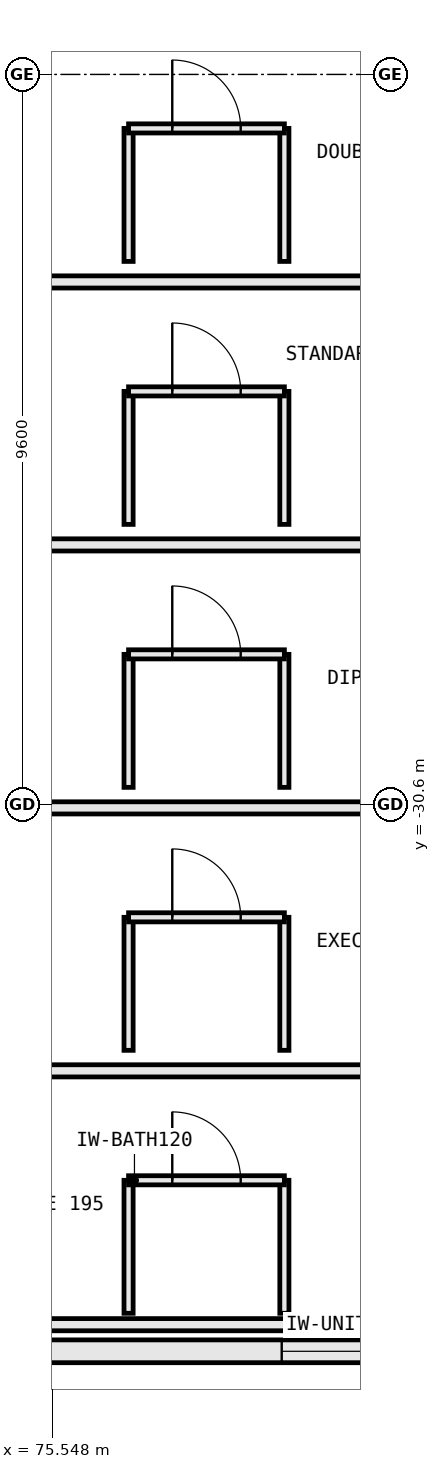
"""IFC4 building model, lengths in metres.
Left out: names, types, materials, properties, quantities, classifications, styles, units other than length and angle.
Written with IfcOpenShell. Run it as: python <this file> out.ifc"""

import sys

from ifc_helpers import new_model, si_unit, direction, frame, frame_2d, origin, place, context, subcontext, project, spatial, rectangle, extrude, element, fill, save


model = new_model("IFC4")
c1 = context("Model", 3, precision=1e-05, world=origin(), true_north=direction((0.0, 1.0)))
c2 = subcontext(c1, "Body", "Model", "MODEL_VIEW")
j1 = project(units=[si_unit("LENGTHUNIT", "METRE"), si_unit("PLANEANGLEUNIT", "RADIAN")], contexts=[c1])
p1 = place(None, origin())
s1 = spatial("IfcSite", under=j1, at=p1, CompositionType="ELEMENT")
p2 = place(p1, origin())
s2 = spatial("IfcBuilding", under=s1, at=p2, CompositionType="ELEMENT")
p3 = place(p2, frame((0.0, 0.0, 27.6)))
s3 = spatial("IfcBuildingStorey", under=s2, at=p3, CompositionType="ELEMENT", Elevation=27.6)
p4 = place(p3, frame((75.038, -37.8, 0.0), z_axis=(0.0, 0.0, 1.0), x_axis=(1.0, 0.0, 0.0)))
e1 = element("IfcWall", 1, at=p4, inside=s3, PredefinedType="STANDARD", context=c2, shape_type="SweptSolid", body=[
    extrude(rectangle(XDim=8.704, YDim=0.3, at=frame_2d((4.352, 0.0))), origin(), (0.0, 0.0, 1.0), 2.93),
])
p5 = place(p4, frame((3.527, 0.0, 0.85)))
e2 = element("IfcOpeningElement", 2, at=p5, cuts=e1, PredefinedType="OPENING", context=c2, shape_type="SweptSolid", body=[
    extrude(rectangle(XDim=1.65, YDim=1.8, at=frame_2d((0.825, 0.9))), frame((0.0, 0.162, 0.0), z_axis=(0.0, -1.0, 0.0), x_axis=(1.0, 0.0, 0.0)), (0.0, 0.0, 1.0), 0.324),
])
p6 = place(p3, frame((71.05, -37.45, 0.0), z_axis=(0.0, 0.0, 1.0), x_axis=(1.0, 0.0, 0.0)))
e3 = element("IfcWall", 3, at=p6, inside=s3, PredefinedType="PARTITIONING", context=c2, shape_type="SweptSolid", body=[
    extrude(rectangle(XDim=12.79, YDim=0.16, at=frame_2d((6.395, 0.0))), origin(), (0.0, 0.0, 1.0), 2.83),
])
p7 = place(p3, frame((71.05, -34.11, 0.0), z_axis=(0.0, 0.0, 1.0), x_axis=(1.0, 0.0, 0.0)))
e4 = element("IfcWall", 4, at=p7, inside=s3, PredefinedType="PARTITIONING", context=c2, shape_type="SweptSolid", body=[
    extrude(rectangle(XDim=12.79, YDim=0.16, at=frame_2d((6.395, 0.0))), origin(), (0.0, 0.0, 1.0), 3.555),
])
for number, where, z_axis, x_axis in (
    (5, (76.55, -37.3, 0.0), (0.0, 0.0, 1.0), (0.0, 1.0, 0.0)),
    (6, (78.6, -37.3, 0.0), (0.0, 0.0, 1.0), (0.0, 1.0, 0.0)),
):
    element("IfcWall", number, at=place(p3, frame(where, z_axis=z_axis, x_axis=x_axis)), inside=s3, PredefinedType="PARTITIONING", context=c2, shape_type="SweptSolid", body=[
        extrude(rectangle(XDim=1.75, YDim=0.12, at=frame_2d((0.875, 0.0))), origin(), (0.0, 0.0, 1.0), 3.555),
    ])
p8 = place(p3, frame((76.55, -35.55, 0.0), z_axis=(0.0, 0.0, 1.0), x_axis=(1.0, 0.0, 0.0)))
e7 = element("IfcWall", 7, at=p8, inside=s3, PredefinedType="PARTITIONING", context=c2, shape_type="SweptSolid", body=[
    extrude(rectangle(XDim=2.05, YDim=0.12, at=frame_2d((1.025, 0.0))), origin(), (0.0, 0.0, 1.0), 3.555),
])
p9 = place(p8, frame((0.575, 0.0, 0.0)))
e8 = element("IfcOpeningElement", 8, at=p9, cuts=e7, PredefinedType="OPENING", context=c2, shape_type="SweptSolid", body=[
    extrude(rectangle(XDim=0.9, YDim=2.15, at=frame_2d((0.45, 1.075))), frame((0.0, 0.072, 0.0), z_axis=(0.0, -1.0, 0.0), x_axis=(1.0, 0.0, 0.0)), (0.0, 0.0, 1.0), 0.144),
])
p10 = place(p3, frame((71.05, -30.65, 0.0), z_axis=(0.0, 0.0, 1.0), x_axis=(1.0, 0.0, 0.0)))
e9 = element("IfcWall", 9, at=p10, inside=s3, PredefinedType="PARTITIONING", context=c2, shape_type="SweptSolid", body=[
    extrude(rectangle(XDim=12.79, YDim=0.16, at=frame_2d((6.395, 0.0))), origin(), (0.0, 0.0, 1.0), 3.555),
])
for number, where, z_axis, x_axis in (
    (10, (76.55, -33.84, 0.0), (0.0, 0.0, 1.0), (0.0, 1.0, 0.0)),
    (11, (78.6, -33.84, 0.0), (0.0, 0.0, 1.0), (0.0, 1.0, 0.0)),
):
    element("IfcWall", number, at=place(p3, frame(where, z_axis=z_axis, x_axis=x_axis)), inside=s3, PredefinedType="PARTITIONING", context=c2, shape_type="SweptSolid", body=[
        extrude(rectangle(XDim=1.75, YDim=0.12, at=frame_2d((0.875, 0.0))), origin(), (0.0, 0.0, 1.0), 3.555),
    ])
p11 = place(p3, frame((76.55, -32.09, 0.0), z_axis=(0.0, 0.0, 1.0), x_axis=(1.0, 0.0, 0.0)))
e12 = element("IfcWall", 12, at=p11, inside=s3, PredefinedType="PARTITIONING", context=c2, shape_type="SweptSolid", body=[
    extrude(rectangle(XDim=2.05, YDim=0.12, at=frame_2d((1.025, 0.0))), origin(), (0.0, 0.0, 1.0), 3.555),
])
p12 = place(p11, frame((0.575, 0.0, 0.0)))
e13 = element("IfcOpeningElement", 13, at=p12, cuts=e12, PredefinedType="OPENING", context=c2, shape_type="SweptSolid", body=[
    extrude(rectangle(XDim=0.9, YDim=2.15, at=frame_2d((0.45, 1.075))), frame((0.0, 0.072, 0.0), z_axis=(0.0, -1.0, 0.0), x_axis=(1.0, 0.0, 0.0)), (0.0, 0.0, 1.0), 0.144),
])
p13 = place(p3, frame((71.05, -27.19, 0.0), z_axis=(0.0, 0.0, 1.0), x_axis=(1.0, 0.0, 0.0)))
e14 = element("IfcWall", 14, at=p13, inside=s3, PredefinedType="PARTITIONING", context=c2, shape_type="SweptSolid", body=[
    extrude(rectangle(XDim=12.79, YDim=0.16, at=frame_2d((6.395, 0.0))), origin(), (0.0, 0.0, 1.0), 3.555),
])
for number, where, z_axis, x_axis in (
    (15, (76.55, -30.38, 0.0), (0.0, 0.0, 1.0), (0.0, 1.0, 0.0)),
    (16, (78.6, -30.38, 0.0), (0.0, 0.0, 1.0), (0.0, 1.0, 0.0)),
):
    element("IfcWall", number, at=place(p3, frame(where, z_axis=z_axis, x_axis=x_axis)), inside=s3, PredefinedType="PARTITIONING", context=c2, shape_type="SweptSolid", body=[
        extrude(rectangle(XDim=1.75, YDim=0.12, at=frame_2d((0.875, 0.0))), origin(), (0.0, 0.0, 1.0), 3.555),
    ])
p14 = place(p3, frame((76.55, -28.63, 0.0), z_axis=(0.0, 0.0, 1.0), x_axis=(1.0, 0.0, 0.0)))
e17 = element("IfcWall", 17, at=p14, inside=s3, PredefinedType="PARTITIONING", context=c2, shape_type="SweptSolid", body=[
    extrude(rectangle(XDim=2.05, YDim=0.12, at=frame_2d((1.025, 0.0))), origin(), (0.0, 0.0, 1.0), 3.555),
])
p15 = place(p14, frame((0.575, 0.0, 0.0)))
e18 = element("IfcOpeningElement", 18, at=p15, cuts=e17, PredefinedType="OPENING", context=c2, shape_type="SweptSolid", body=[
    extrude(rectangle(XDim=0.9, YDim=2.15, at=frame_2d((0.45, 1.075))), frame((0.0, 0.072, 0.0), z_axis=(0.0, -1.0, 0.0), x_axis=(1.0, 0.0, 0.0)), (0.0, 0.0, 1.0), 0.144),
])
p16 = place(p3, frame((71.05, -23.73, 0.0), z_axis=(0.0, 0.0, 1.0), x_axis=(1.0, 0.0, 0.0)))
e19 = element("IfcWall", 19, at=p16, inside=s3, PredefinedType="PARTITIONING", context=c2, shape_type="SweptSolid", body=[
    extrude(rectangle(XDim=12.79, YDim=0.16, at=frame_2d((6.395, 0.0))), origin(), (0.0, 0.0, 1.0), 2.83),
])
for number, where, z_axis, x_axis in (
    (20, (76.55, -26.92, 0.0), (0.0, 0.0, 1.0), (0.0, 1.0, 0.0)),
    (21, (78.6, -26.92, 0.0), (0.0, 0.0, 1.0), (0.0, 1.0, 0.0)),
):
    element("IfcWall", number, at=place(p3, frame(where, z_axis=z_axis, x_axis=x_axis)), inside=s3, PredefinedType="PARTITIONING", context=c2, shape_type="SweptSolid", body=[
        extrude(rectangle(XDim=1.75, YDim=0.12, at=frame_2d((0.875, 0.0))), origin(), (0.0, 0.0, 1.0), 3.555),
    ])
p17 = place(p3, frame((76.55, -25.17, 0.0), z_axis=(0.0, 0.0, 1.0), x_axis=(1.0, 0.0, 0.0)))
e22 = element("IfcWall", 22, at=p17, inside=s3, PredefinedType="PARTITIONING", context=c2, shape_type="SweptSolid", body=[
    extrude(rectangle(XDim=2.05, YDim=0.12, at=frame_2d((1.025, 0.0))), origin(), (0.0, 0.0, 1.0), 3.555),
])
p18 = place(p17, frame((0.575, 0.0, 0.0)))
e23 = element("IfcOpeningElement", 23, at=p18, cuts=e22, PredefinedType="OPENING", context=c2, shape_type="SweptSolid", body=[
    extrude(rectangle(XDim=0.9, YDim=2.15, at=frame_2d((0.45, 1.075))), frame((0.0, 0.072, 0.0), z_axis=(0.0, -1.0, 0.0), x_axis=(1.0, 0.0, 0.0)), (0.0, 0.0, 1.0), 0.144),
])
for number, where, z_axis, x_axis in (
    (24, (76.55, -23.46, 0.0), (0.0, 0.0, 1.0), (0.0, 1.0, 0.0)),
    (25, (78.6, -23.46, 0.0), (0.0, 0.0, 1.0), (0.0, 1.0, 0.0)),
):
    element("IfcWall", number, at=place(p3, frame(where, z_axis=z_axis, x_axis=x_axis)), inside=s3, PredefinedType="PARTITIONING", context=c2, shape_type="SweptSolid", body=[
        extrude(rectangle(XDim=1.75, YDim=0.12, at=frame_2d((0.875, 0.0))), origin(), (0.0, 0.0, 1.0), 3.555),
    ])
p19 = place(p3, frame((76.55, -21.71, 0.0), z_axis=(0.0, 0.0, 1.0), x_axis=(1.0, 0.0, 0.0)))
e26 = element("IfcWall", 26, at=p19, inside=s3, PredefinedType="PARTITIONING", context=c2, shape_type="SweptSolid", body=[
    extrude(rectangle(XDim=2.05, YDim=0.12, at=frame_2d((1.025, 0.0))), origin(), (0.0, 0.0, 1.0), 3.555),
])
p20 = place(p19, frame((0.575, 0.0, 0.0)))
e27 = element("IfcOpeningElement", 27, at=p20, cuts=e26, PredefinedType="OPENING", context=c2, shape_type="SweptSolid", body=[
    extrude(rectangle(XDim=0.9, YDim=2.15, at=frame_2d((0.45, 1.075))), frame((0.0, 0.072, 0.0), z_axis=(0.0, -1.0, 0.0), x_axis=(1.0, 0.0, 0.0)), (0.0, 0.0, 1.0), 0.144),
])
p21 = place(p5, origin())
e28 = element("IfcWindow", 28, at=p21, inside=s3, PartitioningType="SINGLE_PANEL", PredefinedType="WINDOW", context=c2, shape_type="SweptSolid", body=[
    extrude(rectangle(XDim=1.65, YDim=1.8, at=frame_2d((0.825, 0.9))), frame((0.0, 0.03, 0.0), z_axis=(0.0, -1.0, 0.0), x_axis=(1.0, 0.0, 0.0)), (0.0, 0.0, 1.0), 0.06),
])
fill(e2, e28)
p22 = place(p9, origin())
e29 = element("IfcDoor", 29, at=p22, inside=s3, OperationType="SINGLE_SWING_LEFT", PredefinedType="DOOR", context=c2, shape_type="SweptSolid", body=[
    extrude(rectangle(XDim=0.9, YDim=2.15, at=frame_2d((0.45, 1.075))), frame((0.0, 0.025, 0.0), z_axis=(0.0, -1.0, 0.0), x_axis=(1.0, 0.0, 0.0)), (0.0, 0.0, 1.0), 0.05),
])
fill(e8, e29)
p23 = place(p12, origin())
e30 = element("IfcDoor", 30, at=p23, inside=s3, OperationType="SINGLE_SWING_LEFT", PredefinedType="DOOR", context=c2, shape_type="SweptSolid", body=[
    extrude(rectangle(XDim=0.9, YDim=2.15, at=frame_2d((0.45, 1.075))), frame((0.0, 0.025, 0.0), z_axis=(0.0, -1.0, 0.0), x_axis=(1.0, 0.0, 0.0)), (0.0, 0.0, 1.0), 0.05),
])
fill(e13, e30)
p24 = place(p15, origin())
e31 = element("IfcDoor", 31, at=p24, inside=s3, OperationType="SINGLE_SWING_LEFT", PredefinedType="DOOR", context=c2, shape_type="SweptSolid", body=[
    extrude(rectangle(XDim=0.9, YDim=2.15, at=frame_2d((0.45, 1.075))), frame((0.0, 0.025, 0.0), z_axis=(0.0, -1.0, 0.0), x_axis=(1.0, 0.0, 0.0)), (0.0, 0.0, 1.0), 0.05),
])
fill(e18, e31)
p25 = place(p18, origin())
e32 = element("IfcDoor", 32, at=p25, inside=s3, OperationType="SINGLE_SWING_LEFT", PredefinedType="DOOR", context=c2, shape_type="SweptSolid", body=[
    extrude(rectangle(XDim=0.9, YDim=2.15, at=frame_2d((0.45, 1.075))), frame((0.0, 0.025, 0.0), z_axis=(0.0, -1.0, 0.0), x_axis=(1.0, 0.0, 0.0)), (0.0, 0.0, 1.0), 0.05),
])
fill(e23, e32)
p26 = place(p20, origin())
e33 = element("IfcDoor", 33, at=p26, inside=s3, OperationType="SINGLE_SWING_LEFT", PredefinedType="DOOR", context=c2, shape_type="SweptSolid", body=[
    extrude(rectangle(XDim=0.9, YDim=2.15, at=frame_2d((0.45, 1.075))), frame((0.0, 0.025, 0.0), z_axis=(0.0, -1.0, 0.0), x_axis=(1.0, 0.0, 0.0)), (0.0, 0.0, 1.0), 0.05),
])
fill(e27, e33)
save(model, sys.argv[1])
